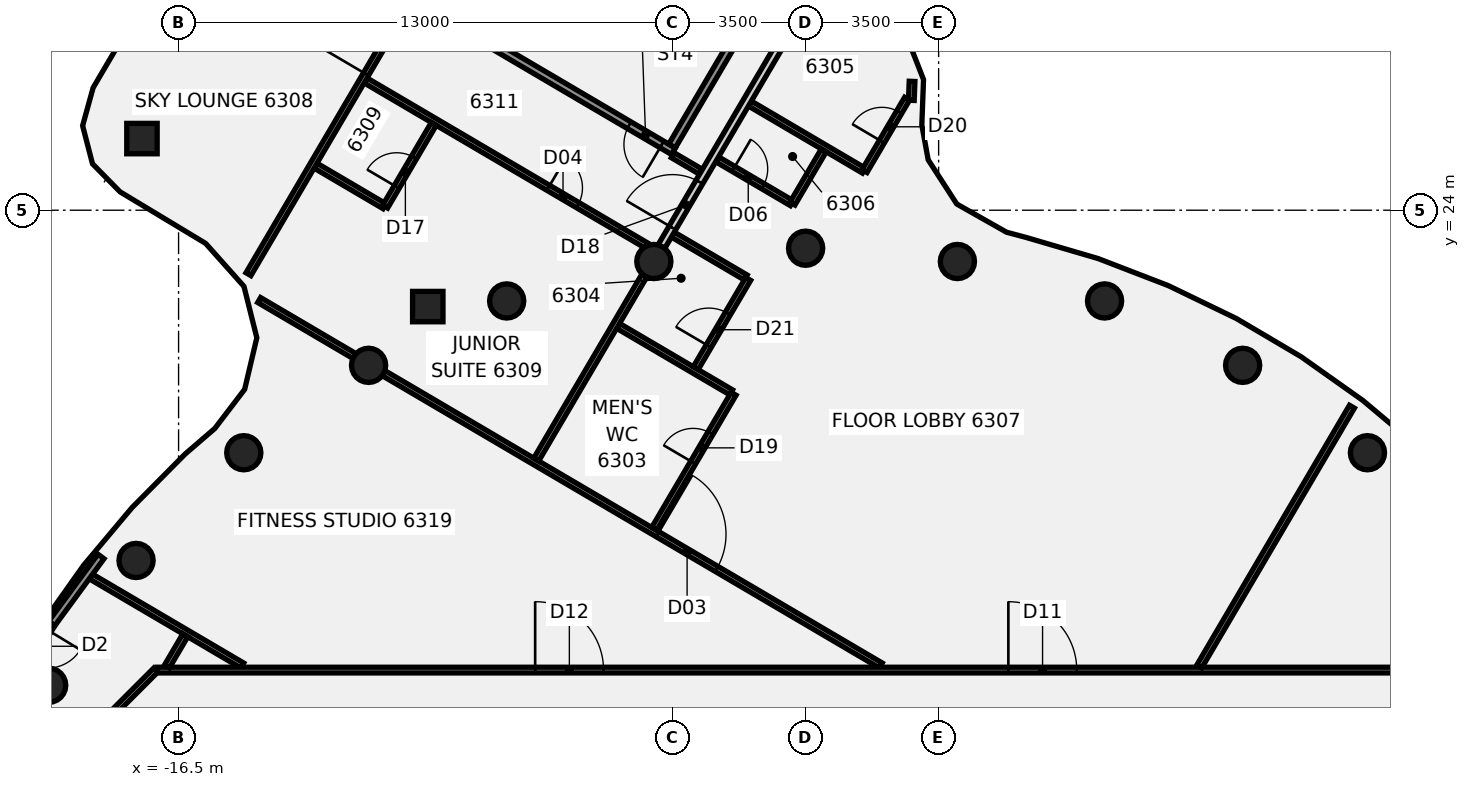
"""IFC4 building model, lengths in metres.
Left out: names, types, materials, properties, quantities, classifications, styles, units other than length and angle.
Written with IfcOpenShell. Run it as: python <this file> out.ifc"""

import sys

from ifc_helpers import new_model, si_unit, direction, frame, frame_2d, origin, origin_2d, place, context, subcontext, project, spatial, rectangle, circle, extrude, element, fill, save


model = new_model("IFC4")
c1 = context("Model", 3, precision=1e-05, world=origin(), true_north=direction((0.0, 1.0)))
c2 = subcontext(c1, "Body", "Model", "MODEL_VIEW")
j1 = project(units=[si_unit("LENGTHUNIT", "METRE"), si_unit("PLANEANGLEUNIT", "RADIAN")], contexts=[c1])
p1 = place(None, origin())
s1 = spatial("IfcSite", under=j1, at=p1, CompositionType="ELEMENT")
p2 = place(p1, origin())
s2 = spatial("IfcBuilding", under=s1, at=p2, CompositionType="ELEMENT")
p3 = place(p2, frame((0.0, 0.0, 248.7)))
s3 = spatial("IfcBuildingStorey", under=s2, at=p3, CompositionType="ELEMENT", Elevation=248.7)
for number, where, z_axis, x_axis in (
    (1, (14.784, 17.619, -0.14), (0.0, 0.0, 1.0), (1.0, 0.0, 0.0)),
    (2, (11.5, 19.919, -0.14), (0.0, 0.0, 1.0), (1.0, 0.0, 0.0)),
    (3, (7.866, 21.613, -0.14), (0.0, 0.0, 1.0), (1.0, 0.0, 0.0)),
    (4, (3.994, 22.651, -0.14), (0.0, 0.0, 1.0), (1.0, 0.0, 0.0)),
    (5, (0.0, 23.0, -0.14), (0.0, 0.0, 1.0), (1.0, 0.0, 0.0)),
    (6, (-3.994, 22.651, -0.14), (0.0, 0.0, 1.0), (1.0, 0.0, 0.0)),
    (7, (-7.866, 21.613, -0.14), (0.0, 0.0, 1.0), (1.0, 0.0, 0.0)),
    (8, (-11.5, 19.919, -0.14), (0.0, 0.0, 1.0), (1.0, 0.0, 0.0)),
    (9, (-14.784, 17.619, -0.14), (0.0, 0.0, 1.0), (1.0, 0.0, 0.0)),
    (10, (-17.619, 14.784, -0.14), (0.0, 0.0, 1.0), (1.0, 0.0, 0.0)),
    (11, (-19.919, 11.5, -0.14), (0.0, 0.0, 1.0), (1.0, 0.0, 0.0)),
):
    element("IfcColumn", number, at=place(p3, frame(where, z_axis=z_axis, x_axis=x_axis)), inside=s3, PredefinedType="COLUMN", context=c2, shape_type="SweptSolid", body=[
        extrude(circle(Radius=0.45, at=origin_2d()), origin(), (0.0, 0.0, 1.0), 3.56),
    ])
p4 = place(p3, frame((-9.942, 21.464, -0.139), z_axis=(0.003155230399, -0.05089523818, 0.998699013343), x_axis=(0.507685971552, 0.860505664301, 0.042248739576)))
e12 = element("IfcColumn", 12, at=p4, inside=s3, PredefinedType="COLUMN", context=c2, shape_type="SweptSolid", body=[
    extrude(rectangle(XDim=0.8, YDim=0.8, at=origin_2d()), origin(), (0.0, 0.0, 1.0), 3.559),
])
p5 = place(p3, frame((-17.464, 25.885, -0.137), z_axis=(0.068808591822, -0.137956811442, 0.988045189183), x_axis=(0.509660839858, 0.85625889674, 0.08406265561)))
e13 = element("IfcColumn", 13, at=p5, inside=s3, PredefinedType="COLUMN", context=c2, shape_type="SweptSolid", body=[
    extrude(rectangle(XDim=0.8, YDim=0.8, at=origin_2d()), origin(), (0.0, 0.0, 1.0), 3.594),
])
p6 = place(p3, frame((-18.83, 14.376, 0.0), z_axis=(0.0, 0.0, 1.0), x_axis=(0.862085468811, -0.506762907547, 0.0)))
e14 = element("IfcWall", 14, at=p6, inside=s3, PredefinedType="PARTITIONING", context=c2, shape_type="SweptSolid", body=[
    extrude(rectangle(XDim=4.646, YDim=0.15, at=frame_2d((2.323, 0.0))), origin(), (0.0, 0.0, 1.0), 2.824),
])
p7 = place(p3, frame((-14.379, 21.637, 0.0), z_axis=(0.0, 0.0, 1.0), x_axis=(0.862098659061, -0.506740468134, 0.0)))
e15 = element("IfcWall", 15, at=p7, inside=s3, PredefinedType="PARTITIONING", context=c2, shape_type="SweptSolid", body=[
    extrude(rectangle(XDim=3.129, YDim=0.15, at=frame_2d((1.564, 0.0))), origin(), (0.0, 0.0, 1.0), 2.824),
])
p8 = place(p3, frame((-11.294, 19.823, 0.0), z_axis=(0.0, 0.0, 1.0), x_axis=(0.862088271049, -0.506758140457, 0.0)))
e16 = element("IfcWall", 16, at=p8, inside=s3, PredefinedType="PARTITIONING", context=c2, shape_type="SweptSolid", body=[
    extrude(rectangle(XDim=15.396, YDim=0.15, at=frame_2d((7.698, 0.0))), origin(), (0.0, 0.0, 1.0), 2.824),
])
p9 = place(p8, frame((8.583, 0.0, 0.0)))
e17 = element("IfcOpeningElement", 17, at=p9, cuts=e16, PredefinedType="OPENING", context=c2, shape_type="SweptSolid", body=[
    extrude(rectangle(XDim=1.8, YDim=2.1, at=frame_2d((0.9, 1.05))), frame((0.0, 0.085, 0.0), z_axis=(0.0, -1.0, 0.0), x_axis=(1.0, 0.0, 0.0)), (0.0, 0.0, 1.0), 0.17),
])
p10 = place(p3, frame((-12.896, 25.172, 0.0), z_axis=(0.0, 0.0, 1.0), x_axis=(0.862032569566, -0.506852886948, 0.0)))
e18 = element("IfcWall", 18, at=p10, inside=s3, PredefinedType="PARTITIONING", context=c2, shape_type="SweptSolid", body=[
    extrude(rectangle(XDim=2.105, YDim=0.15, at=frame_2d((1.053, 0.0))), origin(), (0.0, 0.0, 1.0), 2.824),
])
p11 = place(p3, frame((-11.578, 27.414, 0.0), z_axis=(0.0, 0.0, 1.0), x_axis=(0.862113201937, -0.50671572607, 0.0)))
e19 = element("IfcWall", 19, at=p11, inside=s3, PredefinedType="PARTITIONING", context=c2, shape_type="SweptSolid", body=[
    extrude(rectangle(XDim=8.588, YDim=0.15, at=frame_2d((4.294, 0.0))), origin(), (0.0, 0.0, 1.0), 2.82),
])
p12 = place(p11, frame((5.575, 0.0, 0.0)))
e20 = element("IfcOpeningElement", 20, at=p12, cuts=e19, PredefinedType="OPENING", context=c2, shape_type="SweptSolid", body=[
    extrude(rectangle(XDim=0.9, YDim=2.1, at=frame_2d((0.45, 1.05))), frame((0.0, 0.085, 0.0), z_axis=(0.0, -1.0, 0.0), x_axis=(1.0, 0.0, 0.0)), (0.0, 0.0, 1.0), 0.17),
])
p13 = place(p3, frame((-3.496, 25.447, 0.0), z_axis=(0.0, 0.0, 1.0), x_axis=(0.862116595813, -0.50670995177, 0.0)))
e21 = element("IfcWall", 21, at=p13, inside=s3, PredefinedType="PARTITIONING", context=c2, shape_type="SweptSolid", body=[
    extrude(rectangle(XDim=0.86, YDim=0.15, at=frame_2d((0.43, 0.0))), origin(), (0.0, 0.0, 1.0), 2.824),
])
p14 = place(p3, frame((-4.934, 20.956, 0.0), z_axis=(0.0, 0.0, 1.0), x_axis=(0.862152421238, -0.506648993439, 0.0)))
e22 = element("IfcWall", 22, at=p14, inside=s3, PredefinedType="PARTITIONING", context=c2, shape_type="SweptSolid", body=[
    extrude(rectangle(XDim=3.45, YDim=0.15, at=frame_2d((1.725, 0.0))), origin(), (0.0, 0.0, 1.0), 2.824),
])
p15 = place(p3, frame((-3.494, 23.357, 0.0), z_axis=(0.0, 0.0, 1.0), x_axis=(0.862114686067, -0.506713201, 0.0)))
e23 = element("IfcWall", 23, at=p15, inside=s3, PredefinedType="PARTITIONING", context=c2, shape_type="SweptSolid", body=[
    extrude(rectangle(XDim=2.225, YDim=0.15, at=frame_2d((1.113, 0.0))), origin(), (0.0, 0.0, 1.0), 2.824),
])
p16 = place(p3, frame((-2.329, 25.34, 0.0), z_axis=(0.0, 0.0, 1.0), x_axis=(0.862115841081, -0.506711235871, 0.0)))
e24 = element("IfcWall", 24, at=p16, inside=s3, PredefinedType="PARTITIONING", context=c2, shape_type="SweptSolid", body=[
    extrude(rectangle(XDim=2.28, YDim=0.15, at=frame_2d((1.14, 0.0))), origin(), (0.0, 0.0, 1.0), 2.824),
])
p17 = place(p16, frame((0.5, 0.0, 0.0)))
e25 = element("IfcOpeningElement", 25, at=p17, cuts=e24, PredefinedType="OPENING", context=c2, shape_type="SweptSolid", body=[
    extrude(rectangle(XDim=0.9, YDim=2.1, at=frame_2d((0.45, 1.05))), frame((0.0, 0.085, 0.0), z_axis=(0.0, -1.0, 0.0), x_axis=(1.0, 0.0, 0.0)), (0.0, 0.0, 1.0), 0.17),
])
p18 = place(p3, frame((-1.467, 26.806, 0.0), z_axis=(0.0, 0.0, 1.0), x_axis=(0.861936018647, -0.507017060619, 0.0)))
e26 = element("IfcWall", 26, at=p18, inside=s3, PredefinedType="PARTITIONING", context=c2, shape_type="SweptSolid", body=[
    extrude(rectangle(XDim=3.48, YDim=0.15, at=frame_2d((1.74, 0.0))), origin(), (0.0, 0.0, 1.0), 2.824),
])
p19 = place(p3, frame((-17.065, 11.9, 0.0), z_axis=(0.0, 0.0, 1.0), x_axis=(1.0, 0.0, 0.0)))
e27 = element("IfcWall", 27, at=p19, inside=s3, PredefinedType="PARTITIONING", context=c2, shape_type="SweptSolid", body=[
    extrude(rectangle(XDim=34.165, YDim=0.15, at=frame_2d((17.083, 0.0))), origin(), (0.0, 0.0, 1.0), 2.824),
])
p20 = place(p19, frame((22.4, 0.0, 0.0)))
e28 = element("IfcOpeningElement", 28, at=p20, cuts=e27, PredefinedType="OPENING", context=c2, shape_type="SweptSolid", body=[
    extrude(rectangle(XDim=1.8, YDim=2.1, at=frame_2d((0.9, 1.05))), frame((0.0, 0.085, 0.0), z_axis=(0.0, -1.0, 0.0), x_axis=(1.0, 0.0, 0.0)), (0.0, 0.0, 1.0), 0.17),
])
p21 = place(p19, frame((9.948, 0.0, 0.0)))
e29 = element("IfcOpeningElement", 29, at=p21, cuts=e27, PredefinedType="OPENING", context=c2, shape_type="SweptSolid", body=[
    extrude(rectangle(XDim=1.8, YDim=2.1, at=frame_2d((0.9, 1.05))), frame((0.0, 0.085, 0.0), z_axis=(0.0, -1.0, 0.0), x_axis=(1.0, 0.0, 0.0)), (0.0, 0.0, 1.0), 0.17),
])
p22 = place(p3, frame((-18.872, 10.128, 0.0), z_axis=(0.0, 0.0, 1.0), x_axis=(0.707106781187, 0.707106781187, 0.0)))
e30 = element("IfcWall", 30, at=p22, inside=s3, PredefinedType="PARTITIONING", context=c2, shape_type="SweptSolid", body=[
    extrude(rectangle(XDim=2.505, YDim=0.15, at=frame_2d((1.253, 0.0))), origin(), (0.0, 0.0, 1.0), 2.824),
])
p23 = place(p3, frame((-16.806, 11.995, 0.0), z_axis=(0.0, 0.0, 1.0), x_axis=(0.506627709985, 0.862164928233, 0.0)))
e31 = element("IfcWall", 31, at=p23, inside=s3, PredefinedType="PARTITIONING", context=c2, shape_type="SweptSolid", body=[
    extrude(rectangle(XDim=0.952, YDim=0.15, at=frame_2d((0.476, 0.0))), origin(), (0.0, 0.0, 1.0), 2.824),
])
p24 = place(p3, frame((-14.662, 22.317, 0.0), z_axis=(0.0, 0.0, 1.0), x_axis=(0.506732099473, 0.862103578094, 0.0)))
e32 = element("IfcWall", 32, at=p24, inside=s3, PredefinedType="PARTITIONING", context=c2, shape_type="SweptSolid", body=[
    extrude(rectangle(XDim=13.855, YDim=0.15, at=frame_2d((6.928, 0.0))), origin(), (0.0, 0.0, 1.0), 2.82),
])
p25 = place(p24, frame((6.107, 0.0, 0.0)))
e33 = element("IfcOpeningElement", 33, at=p25, cuts=e32, PredefinedType="OPENING", context=c2, shape_type="SweptSolid", body=[
    extrude(rectangle(XDim=1.8, YDim=2.1, at=frame_2d((0.9, 1.05))), frame((0.0, 0.085, 0.0), z_axis=(0.0, -1.0, 0.0), x_axis=(1.0, 0.0, 0.0)), (0.0, 0.0, 1.0), 0.17),
])
p26 = place(p3, frame((-11.064, 24.095, 0.0), z_axis=(0.0, 0.0, 1.0), x_axis=(0.506813115259, 0.862055953057, 0.0)))
e34 = element("IfcWall", 34, at=p26, inside=s3, PredefinedType="PARTITIONING", context=c2, shape_type="SweptSolid", body=[
    extrude(rectangle(XDim=2.526, YDim=0.15, at=frame_2d((1.263, 0.0))), origin(), (0.0, 0.0, 1.0), 2.824),
])
p27 = place(p26, frame((0.6, 0.0, 0.0)))
e35 = element("IfcOpeningElement", 35, at=p27, cuts=e34, PredefinedType="OPENING", context=c2, shape_type="SweptSolid", body=[
    extrude(rectangle(XDim=0.9, YDim=2.1, at=frame_2d((0.45, 1.05))), frame((0.0, 0.085, 0.0), z_axis=(0.0, -1.0, 0.0), x_axis=(1.0, 0.0, 0.0)), (0.0, 0.0, 1.0), 0.17),
])
p28 = place(p3, frame((-7.089, 17.439, 0.0), z_axis=(0.0, 0.0, 1.0), x_axis=(0.506780667638, 0.862075028584, 0.0)))
e36 = element("IfcWall", 36, at=p28, inside=s3, PredefinedType="PARTITIONING", context=c2, shape_type="SweptSolid", body=[
    extrude(rectangle(XDim=5.837, YDim=0.15, at=frame_2d((2.919, 0.0))), origin(), (0.0, 0.0, 1.0), 2.824),
])
p29 = place(p3, frame((-3.903, 22.859, 0.0), z_axis=(0.0, 0.0, 1.0), x_axis=(0.506788872143, 0.862070205419, 0.0)))
e37 = element("IfcWall", 37, at=p29, inside=s3, PredefinedType="PARTITIONING", context=c2, shape_type="SweptSolid", body=[
    extrude(rectangle(XDim=7.936, YDim=0.2, at=frame_2d((3.968, 0.0))), origin(), (0.0, 0.0, 1.0), 2.82),
])
p30 = place(p29, frame((0.787, 0.0, 0.0)))
e38 = element("IfcOpeningElement", 38, at=p30, cuts=e37, PredefinedType="OPENING", context=c2, shape_type="SweptSolid", body=[
    extrude(rectangle(XDim=1.4, YDim=2.1, at=frame_2d((0.7, 1.05))), frame((0.0, 0.11, 0.0), z_axis=(0.0, -1.0, 0.0), x_axis=(1.0, 0.0, 0.0)), (0.0, 0.0, 1.0), 0.22),
])
p31 = place(p3, frame((-3.983, 15.618, 0.0), z_axis=(0.0, 0.0, 1.0), x_axis=(0.50683367945, 0.862043862791, 0.0)))
e39 = element("IfcWall", 39, at=p31, inside=s3, PredefinedType="PARTITIONING", context=c2, shape_type="SweptSolid", body=[
    extrude(rectangle(XDim=4.12, YDim=0.15, at=frame_2d((2.06, 0.0))), origin(), (0.0, 0.0, 1.0), 2.824),
])
p32 = place(p31, frame((2.02, 0.0, 0.0)))
e40 = element("IfcOpeningElement", 40, at=p32, cuts=e39, PredefinedType="OPENING", context=c2, shape_type="SweptSolid", body=[
    extrude(rectangle(XDim=0.9, YDim=2.1, at=frame_2d((0.45, 1.05))), frame((0.0, 0.085, 0.0), z_axis=(0.0, -1.0, 0.0), x_axis=(1.0, 0.0, 0.0)), (0.0, 0.0, 1.0), 0.17),
])
p33 = place(p3, frame((1.551, 25.031, 0.0), z_axis=(0.0, 0.0, 1.0), x_axis=(0.506846086744, 0.862036567874, 0.0)))
e41 = element("IfcWall", 41, at=p33, inside=s3, PredefinedType="PARTITIONING", context=c2, shape_type="SweptSolid", body=[
    extrude(rectangle(XDim=2.207, YDim=0.15, at=frame_2d((1.104, 0.0))), origin(), (0.0, 0.0, 1.0), 2.824),
])
p34 = place(p33, frame((0.9, 0.0, 0.0)))
e42 = element("IfcOpeningElement", 42, at=p34, cuts=e41, PredefinedType="OPENING", context=c2, shape_type="SweptSolid", body=[
    extrude(rectangle(XDim=0.9, YDim=2.1, at=frame_2d((0.45, 1.05))), frame((0.0, 0.085, 0.0), z_axis=(0.0, -1.0, 0.0), x_axis=(1.0, 0.0, 0.0)), (0.0, 0.0, 1.0), 0.17),
])
p35 = place(p3, frame((-2.889, 19.847, 0.0), z_axis=(0.0, 0.0, 1.0), x_axis=(0.506753377111, 0.862091071051, 0.0)))
e43 = element("IfcWall", 43, at=p35, inside=s3, PredefinedType="PARTITIONING", context=c2, shape_type="SweptSolid", body=[
    extrude(rectangle(XDim=2.72, YDim=0.15, at=frame_2d((1.36, 0.0))), origin(), (0.0, 0.0, 1.0), 2.824),
])
p36 = place(p35, frame((0.67, 0.0, 0.0)))
e44 = element("IfcOpeningElement", 44, at=p36, cuts=e43, PredefinedType="OPENING", context=c2, shape_type="SweptSolid", body=[
    extrude(rectangle(XDim=1.0, YDim=2.1, at=frame_2d((0.5, 1.05))), frame((0.0, 0.085, 0.0), z_axis=(0.0, -1.0, 0.0), x_axis=(1.0, 0.0, 0.0)), (0.0, 0.0, 1.0), 0.17),
])
p37 = place(p3, frame((-0.345, 24.175, 0.0), z_axis=(0.0, 0.0, 1.0), x_axis=(0.50671800572, 0.862111862045, 0.0)))
e45 = element("IfcWall", 45, at=p37, inside=s3, PredefinedType="PARTITIONING", context=c2, shape_type="SweptSolid", body=[
    extrude(rectangle(XDim=1.625, YDim=0.15, at=frame_2d((0.812, 0.0))), origin(), (0.0, 0.0, 1.0), 2.824),
])
p38 = place(p3, frame((10.359, 11.995, 0.0), z_axis=(0.0, 0.0, 1.0), x_axis=(0.506707864141, 0.862117822816, 0.0)))
e46 = element("IfcWall", 46, at=p38, inside=s3, PredefinedType="PARTITIONING", context=c2, shape_type="SweptSolid", body=[
    extrude(rectangle(XDim=7.928, YDim=0.15, at=frame_2d((3.964, 0.0))), origin(), (0.0, 0.0, 1.0), 2.824),
])
p39 = place(p3, frame((2.782, 26.891, 0.0), z_axis=(0.0, 0.0, 1.0), x_axis=(0.037607785157, 0.999292577024, 0.0)))
e47 = element("IfcWall", 47, at=p39, inside=s3, PredefinedType="PARTITIONING", context=c2, shape_type="SweptSolid", body=[
    extrude(rectangle(XDim=0.5, YDim=0.15, at=frame_2d((0.25, 0.0))), origin(), (0.0, 0.0, 1.0), 2.824),
])
p40 = place(p3, frame((-18.543, 14.889, 0.0), z_axis=(0.0, 0.0, 1.0), x_axis=(-0.591779327433, -0.806100010931, 0.0)))
e48 = element("IfcWall", 48, at=p40, inside=s3, PredefinedType="SOLIDWALL", context=c2, shape_type="SweptSolid", body=[
    extrude(rectangle(XDim=2.189, YDim=0.2, at=frame_2d((1.095, 0.0))), origin(), (0.0, 0.0, 1.0), 3.42),
])
p41 = place(p3, frame((-19.839, 13.125, 0.0), z_axis=(0.0, 0.0, 1.0), x_axis=(-0.518687324951, -0.854964010316, 0.0)))
e49 = element("IfcWall", 49, at=p41, inside=s3, PredefinedType="SOLIDWALL", context=c2, shape_type="SweptSolid", body=[
    extrude(rectangle(XDim=1.599, YDim=0.2, at=frame_2d((0.8, 0.0))), origin(), (0.0, 0.0, 1.0), 3.42),
])
p42 = place(p41, frame((0.2, 0.0, 0.0)))
e50 = element("IfcOpeningElement", 50, at=p42, cuts=e49, PredefinedType="OPENING", context=c2, shape_type="SweptSolid", body=[
    extrude(rectangle(XDim=1.0, YDim=2.4, at=frame_2d((0.5, 1.2))), frame((0.0, 0.11, 0.0), z_axis=(0.0, -1.0, 0.0), x_axis=(1.0, 0.0, 0.0)), (0.0, 0.0, 1.0), 0.22),
])
p43 = place(p3, frame((-3.479, 25.553, -0.14), z_axis=(0.0, 0.0, 1.0), x_axis=(-0.862094350903, 0.506747797371, 0.0)))
e51 = element("IfcWall", 51, at=p43, inside=s3, PredefinedType="SHEAR", context=c2, shape_type="SweptSolid", body=[
    extrude(rectangle(XDim=6.7, YDim=0.2, at=frame_2d((3.35, 0.0))), origin(), (0.0, 0.0, 1.0), 2.96),
])
p44 = place(p43, frame((0.35, 0.0, 0.0)))
e52 = element("IfcOpeningElement", 52, at=p44, cuts=e51, PredefinedType="OPENING", context=c2, shape_type="SweptSolid", body=[
    extrude(rectangle(XDim=1.0, YDim=2.1, at=frame_2d((0.5, 1.05))), frame((0.0, 0.11, 0.0), z_axis=(0.0, -1.0, 0.0), x_axis=(1.0, 0.0, 0.0)), (0.0, 0.0, 1.0), 0.22),
])
p45 = place(p3, frame((-1.893, 28.449, -0.14), z_axis=(0.0, 0.0, 1.0), x_axis=(-0.506733365032, -0.862102834216, 0.0)))
e53 = element("IfcWall", 53, at=p45, inside=s3, PredefinedType="SHEAR", context=c2, shape_type="SweptSolid", body=[
    extrude(rectangle(XDim=3.2, YDim=0.2, at=frame_2d((1.6, 0.0))), origin(), (0.0, 0.0, 1.0), 3.56),
])
p46 = place(p9, frame((1.8, 0.0, 0.0), z_axis=(0.0, 0.0, 1.0), x_axis=(-1.0, 0.0, 0.0)))
e54 = element("IfcDoor", 54, at=p46, inside=s3, OperationType="DOUBLE_DOOR_SINGLE_SWING", PredefinedType="DOOR", context=c2, shape_type="SweptSolid", body=[
    extrude(rectangle(XDim=1.8, YDim=2.1, at=frame_2d((0.9, 1.05))), frame((0.0, 0.025, 0.0), z_axis=(0.0, -1.0, 0.0), x_axis=(1.0, 0.0, 0.0)), (0.0, 0.0, 1.0), 0.05),
])
fill(e17, e54)
p47 = place(p12, frame((0.9, 0.0, 0.0), z_axis=(0.0, 0.0, 1.0), x_axis=(-1.0, 0.0, 0.0)))
e55 = element("IfcDoor", 55, at=p47, inside=s3, OperationType="SINGLE_SWING_RIGHT", PredefinedType="DOOR", context=c2, shape_type="SweptSolid", body=[
    extrude(rectangle(XDim=0.9, YDim=2.1, at=frame_2d((0.45, 1.05))), frame((0.0, 0.025, 0.0), z_axis=(0.0, -1.0, 0.0), x_axis=(1.0, 0.0, 0.0)), (0.0, 0.0, 1.0), 0.05),
])
fill(e20, e55)
p48 = place(p17, origin())
e56 = element("IfcDoor", 56, at=p48, inside=s3, OperationType="SINGLE_SWING_RIGHT", PredefinedType="DOOR", context=c2, shape_type="SweptSolid", body=[
    extrude(rectangle(XDim=0.9, YDim=2.1, at=frame_2d((0.45, 1.05))), frame((0.0, 0.025, 0.0), z_axis=(0.0, -1.0, 0.0), x_axis=(1.0, 0.0, 0.0)), (0.0, 0.0, 1.0), 0.05),
])
fill(e25, e56)
p49 = place(p20, frame((1.8, 0.0, 0.0), z_axis=(0.0, 0.0, 1.0), x_axis=(-1.0, 0.0, 0.0)))
e57 = element("IfcDoor", 57, at=p49, inside=s3, OperationType="DOUBLE_DOOR_SINGLE_SWING", PredefinedType="DOOR", context=c2, shape_type="SweptSolid", body=[
    extrude(rectangle(XDim=1.8, YDim=2.1, at=frame_2d((0.9, 1.05))), frame((0.0, 0.025, 0.0), z_axis=(0.0, -1.0, 0.0), x_axis=(1.0, 0.0, 0.0)), (0.0, 0.0, 1.0), 0.05),
])
fill(e28, e57)
p50 = place(p21, origin())
e58 = element("IfcDoor", 58, at=p50, inside=s3, OperationType="DOUBLE_DOOR_SINGLE_SWING", PredefinedType="DOOR", context=c2, shape_type="SweptSolid", body=[
    extrude(rectangle(XDim=1.8, YDim=2.1, at=frame_2d((0.9, 1.05))), frame((0.0, 0.025, 0.0), z_axis=(0.0, -1.0, 0.0), x_axis=(1.0, 0.0, 0.0)), (0.0, 0.0, 1.0), 0.05),
])
fill(e29, e58)
p51 = place(p25, origin())
e59 = element("IfcDoor", 59, at=p51, inside=s3, OperationType="DOUBLE_DOOR_SINGLE_SWING", PredefinedType="DOOR", context=c2, shape_type="SweptSolid", body=[
    extrude(rectangle(XDim=1.8, YDim=2.1, at=frame_2d((0.9, 1.05))), frame((0.0, 0.025, 0.0), z_axis=(0.0, -1.0, 0.0), x_axis=(1.0, 0.0, 0.0)), (0.0, 0.0, 1.0), 0.05),
])
fill(e33, e59)
p52 = place(p27, origin())
e60 = element("IfcDoor", 60, at=p52, inside=s3, OperationType="SINGLE_SWING_RIGHT", PredefinedType="DOOR", context=c2, shape_type="SweptSolid", body=[
    extrude(rectangle(XDim=0.9, YDim=2.1, at=frame_2d((0.45, 1.05))), frame((0.0, 0.025, 0.0), z_axis=(0.0, -1.0, 0.0), x_axis=(1.0, 0.0, 0.0)), (0.0, 0.0, 1.0), 0.05),
])
fill(e35, e60)
p53 = place(p30, frame((1.4, 0.0, 0.0), z_axis=(0.0, 0.0, 1.0), x_axis=(-1.0, 0.0, 0.0)))
e61 = element("IfcDoor", 61, at=p53, inside=s3, OperationType="DOUBLE_DOOR_SINGLE_SWING", PredefinedType="DOOR", context=c2, shape_type="SweptSolid", body=[
    extrude(rectangle(XDim=1.4, YDim=2.1, at=frame_2d((0.7, 1.05))), frame((0.0, 0.025, 0.0), z_axis=(0.0, -1.0, 0.0), x_axis=(1.0, 0.0, 0.0)), (0.0, 0.0, 1.0), 0.05),
])
fill(e38, e61)
p54 = place(p32, origin())
e62 = element("IfcDoor", 62, at=p54, inside=s3, OperationType="SINGLE_SWING_LEFT", PredefinedType="DOOR", context=c2, shape_type="SweptSolid", body=[
    extrude(rectangle(XDim=0.9, YDim=2.1, at=frame_2d((0.45, 1.05))), frame((0.0, 0.025, 0.0), z_axis=(0.0, -1.0, 0.0), x_axis=(1.0, 0.0, 0.0)), (0.0, 0.0, 1.0), 0.05),
])
fill(e40, e62)
p55 = place(p34, origin())
e63 = element("IfcDoor", 63, at=p55, inside=s3, OperationType="SINGLE_SWING_LEFT", PredefinedType="DOOR", context=c2, shape_type="SweptSolid", body=[
    extrude(rectangle(XDim=0.9, YDim=2.1, at=frame_2d((0.45, 1.05))), frame((0.0, 0.025, 0.0), z_axis=(0.0, -1.0, 0.0), x_axis=(1.0, 0.0, 0.0)), (0.0, 0.0, 1.0), 0.05),
])
fill(e42, e63)
p56 = place(p36, origin())
e64 = element("IfcDoor", 64, at=p56, inside=s3, OperationType="SINGLE_SWING_RIGHT", PredefinedType="DOOR", context=c2, shape_type="SweptSolid", body=[
    extrude(rectangle(XDim=1.0, YDim=2.1, at=frame_2d((0.5, 1.05))), frame((0.0, 0.025, 0.0), z_axis=(0.0, -1.0, 0.0), x_axis=(1.0, 0.0, 0.0)), (0.0, 0.0, 1.0), 0.05),
])
fill(e44, e64)
p57 = place(p44, origin())
e65 = element("IfcDoor", 65, at=p57, inside=s3, OperationType="SINGLE_SWING_LEFT", PredefinedType="DOOR", context=c2, shape_type="SweptSolid", body=[
    extrude(rectangle(XDim=1.0, YDim=2.1, at=frame_2d((0.5, 1.05))), frame((0.0, 0.025, 0.0), z_axis=(0.0, -1.0, 0.0), x_axis=(1.0, 0.0, 0.0)), (0.0, 0.0, 1.0), 0.05),
])
fill(e52, e65)
save(model, sys.argv[1])
